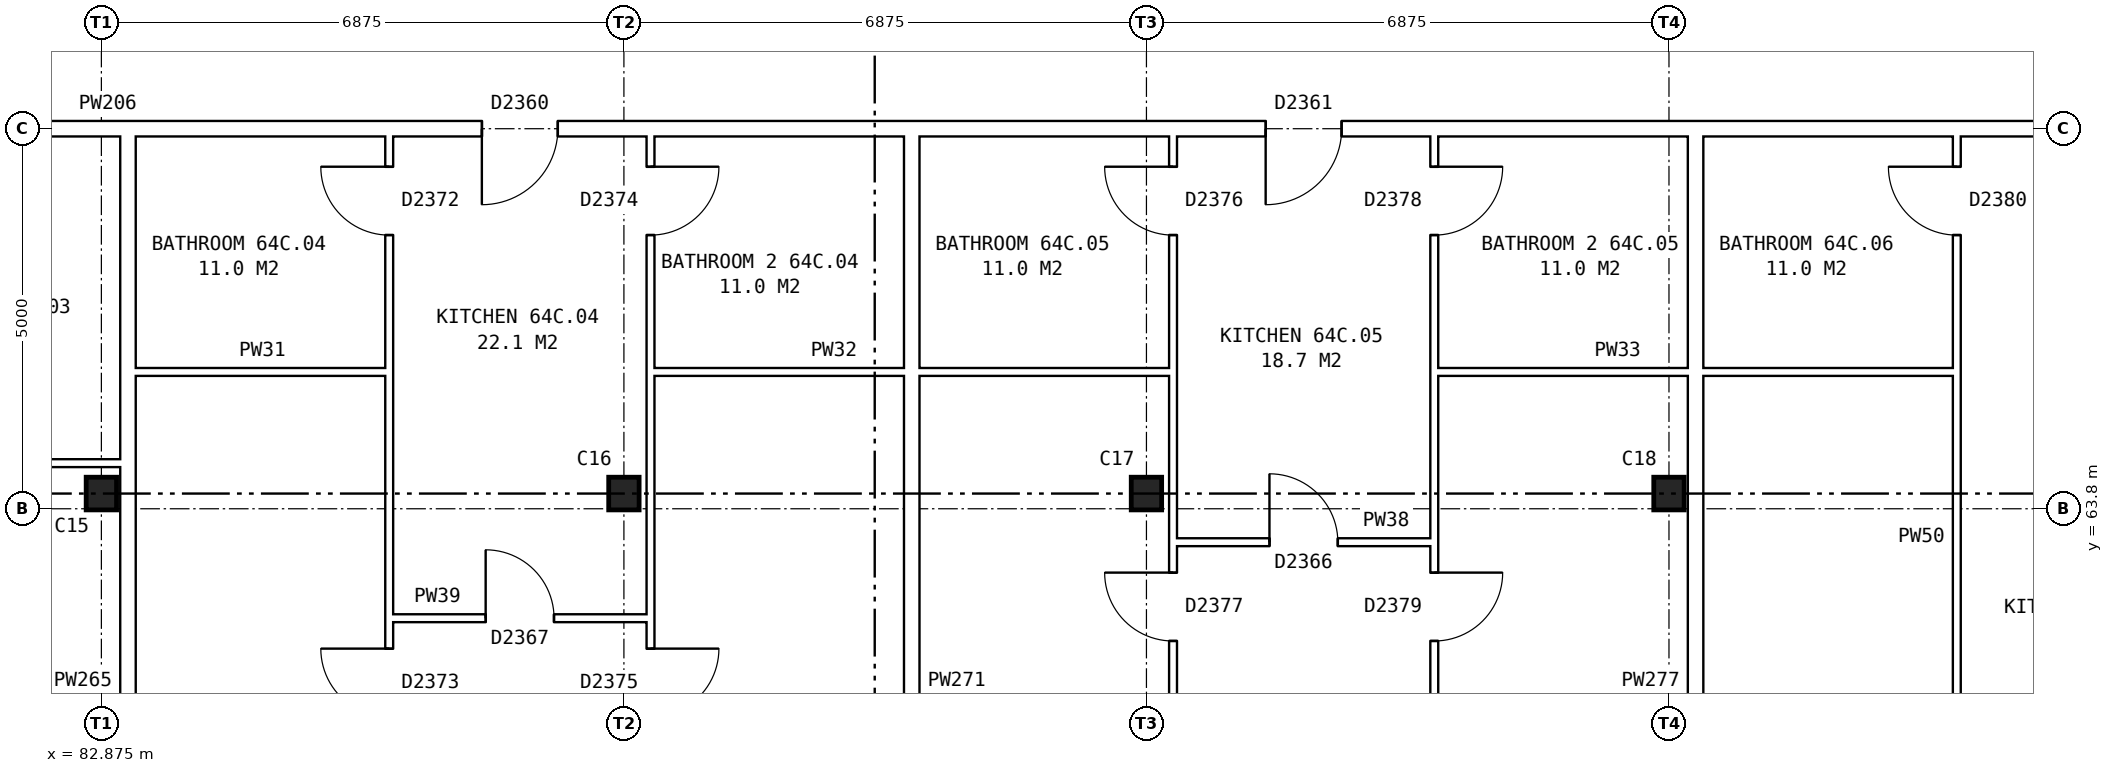
"""IFC4 building model, lengths in metres.
Left out: names, types, materials, properties, quantities, classifications, styles, units other than length and angle.
Written with IfcOpenShell. Run it as: python <this file> out.ifc"""

import sys

from ifc_helpers import new_model, si_unit, direction, frame, frame_2d, origin, origin_2d, place, context, subcontext, project, spatial, rectangle, i_section, extrude, element, fill, save


model = new_model("IFC4")
c1 = context("Model", 3, precision=1e-05, world=origin(), true_north=direction((0.0, 1.0)))
c2 = subcontext(c1, "Body", "Model", "MODEL_VIEW")
j1 = project(units=[si_unit("LENGTHUNIT", "METRE"), si_unit("PLANEANGLEUNIT", "RADIAN")], contexts=[c1])
p1 = place(None, origin())
s1 = spatial("IfcSite", under=j1, at=p1, CompositionType="ELEMENT")
p2 = place(p1, origin())
s2 = spatial("IfcBuilding", under=s1, at=p2, CompositionType="ELEMENT")
p3 = place(p2, frame((0.0, 0.0, 227.6)))
s3 = spatial("IfcBuildingStorey", under=s2, at=p3, CompositionType="ELEMENT", Elevation=227.6)
for number, where, z_axis, x_axis in (
    (1, (82.875, 64.0, 0.0), (0.0, 0.0, 1.0), (1.0, 0.0, 0.0)),
    (2, (89.75, 64.0, 0.0), (0.0, 0.0, 1.0), (1.0, 0.0, 0.0)),
    (3, (96.625, 64.0, 0.0), (0.0, 0.0, 1.0), (1.0, 0.0, 0.0)),
    (4, (103.5, 64.0, 0.0), (0.0, 0.0, 1.0), (1.0, 0.0, 0.0)),
):
    element("IfcColumn", number, at=place(p3, frame(where, z_axis=z_axis, x_axis=x_axis)), inside=s3, PredefinedType="COLUMN", context=c2, shape_type="SweptSolid", body=[
        extrude(i_section(OverallWidth=0.4, OverallDepth=0.43, WebThickness=0.04, FlangeThickness=0.04, at=origin_2d()), origin(), (0.0, 0.0, 1.0), 2.85),
    ])
p4 = place(p3, frame((86.662, 62.36, 0.0), z_axis=(0.0, 0.0, 1.0), x_axis=(1.0, 0.0, 0.0)))
e5 = element("IfcWall", 5, at=p4, inside=s3, PredefinedType="PARTITIONING", context=c2, shape_type="SweptSolid", body=[
    extrude(rectangle(XDim=3.438, YDim=0.1, at=frame_2d((1.719, 0.0))), origin(), (0.0, 0.0, 1.0), 2.85),
])
p5 = place(p4, frame((1.269, 0.0, 0.0)))
e6 = element("IfcOpeningElement", 6, at=p5, cuts=e5, PredefinedType="OPENING", context=c2, shape_type="SweptSolid", body=[
    extrude(rectangle(XDim=0.9, YDim=2.1, at=frame_2d((0.45, 1.05))), frame((0.0, 0.06, 0.0), z_axis=(0.0, -1.0, 0.0), x_axis=(1.0, 0.0, 0.0)), (0.0, 0.0, 1.0), 0.12),
])
p6 = place(p3, frame((96.975, 63.36, 0.0), z_axis=(0.0, 0.0, 1.0), x_axis=(1.0, 0.0, 0.0)))
e7 = element("IfcWall", 7, at=p6, inside=s3, PredefinedType="PARTITIONING", context=c2, shape_type="SweptSolid", body=[
    extrude(rectangle(XDim=3.437, YDim=0.1, at=frame_2d((1.719, 0.0))), origin(), (0.0, 0.0, 1.0), 2.85),
])
p7 = place(p6, frame((1.269, 0.0, 0.0)))
e8 = element("IfcOpeningElement", 8, at=p7, cuts=e7, PredefinedType="OPENING", context=c2, shape_type="SweptSolid", body=[
    extrude(rectangle(XDim=0.9, YDim=2.1, at=frame_2d((0.45, 1.05))), frame((0.0, 0.06, 0.0), z_axis=(0.0, -1.0, 0.0), x_axis=(1.0, 0.0, 0.0)), (0.0, 0.0, 1.0), 0.12),
])
p8 = place(p3, frame((79.438, 64.4, 0.0), z_axis=(0.0, 0.0, 1.0), x_axis=(1.0, 0.0, 0.0)))
e9 = element("IfcWall", 9, at=p8, inside=s3, PredefinedType="PARTITIONING", context=c2, shape_type="SweptSolid", body=[
    extrude(rectangle(XDim=3.687, YDim=0.1, at=frame_2d((1.844, 0.0))), origin(), (0.0, 0.0, 1.0), 2.85),
])
p9 = place(p3, frame((83.325, 65.6, 0.0), z_axis=(0.0, 0.0, 1.0), x_axis=(1.0, 0.0, 0.0)))
e10 = element("IfcWall", 10, at=p9, inside=s3, PredefinedType="PARTITIONING", context=c2, shape_type="SweptSolid", body=[
    extrude(rectangle(XDim=3.337, YDim=0.1, at=frame_2d((1.668, 0.0))), origin(), (0.0, 0.0, 1.0), 2.85),
])
for number, where, z_axis, x_axis in (
    (11, (90.1, 65.6, 0.0), (0.0, 0.0, 1.0), (1.0, 0.0, 0.0)),
    (12, (100.412, 65.6, 0.0), (0.0, 0.0, 1.0), (1.0, 0.0, 0.0)),
):
    element("IfcWall", number, at=place(p3, frame(where, z_axis=z_axis, x_axis=x_axis)), inside=s3, PredefinedType="PARTITIONING", context=c2, shape_type="SweptSolid", body=[
        extrude(rectangle(XDim=6.875, YDim=0.1, at=frame_2d((3.438, 0.0))), origin(), (0.0, 0.0, 1.0), 2.85),
    ])
p10 = place(p3, frame((75.64, 68.8, 0.0), z_axis=(0.0, 0.0, 1.0), x_axis=(1.0, 0.0, 0.0)))
e13 = element("IfcWall", 13, at=p10, inside=s3, PredefinedType="PARTITIONING", context=c2, shape_type="SweptSolid", body=[
    extrude(rectangle(XDim=55.72, YDim=0.2, at=frame_2d((27.86, 0.0))), origin(), (0.0, 0.0, 1.0), 2.85),
])
p11 = place(p10, frame((1.399, 0.0, 0.0)))
e14 = element("IfcOpeningElement", 14, at=p11, cuts=e13, PredefinedType="OPENING", context=c2, shape_type="SweptSolid", body=[
    extrude(rectangle(XDim=1.0, YDim=2.1, at=frame_2d((0.5, 1.05))), frame((0.0, 0.11, 0.0), z_axis=(0.0, -1.0, 0.0), x_axis=(1.0, 0.0, 0.0)), (0.0, 0.0, 1.0), 0.22),
])
p12 = place(p10, frame((12.241, 0.0, 0.0)))
e15 = element("IfcOpeningElement", 15, at=p12, cuts=e13, PredefinedType="OPENING", context=c2, shape_type="SweptSolid", body=[
    extrude(rectangle(XDim=1.0, YDim=2.1, at=frame_2d((0.5, 1.05))), frame((0.0, 0.11, 0.0), z_axis=(0.0, -1.0, 0.0), x_axis=(1.0, 0.0, 0.0)), (0.0, 0.0, 1.0), 0.22),
])
p13 = place(p10, frame((22.553, 0.0, 0.0)))
e16 = element("IfcOpeningElement", 16, at=p13, cuts=e13, PredefinedType="OPENING", context=c2, shape_type="SweptSolid", body=[
    extrude(rectangle(XDim=1.0, YDim=2.1, at=frame_2d((0.5, 1.05))), frame((0.0, 0.11, 0.0), z_axis=(0.0, -1.0, 0.0), x_axis=(1.0, 0.0, 0.0)), (0.0, 0.0, 1.0), 0.22),
])
p14 = place(p10, frame((32.866, 0.0, 0.0)))
e17 = element("IfcOpeningElement", 17, at=p14, cuts=e13, PredefinedType="OPENING", context=c2, shape_type="SweptSolid", body=[
    extrude(rectangle(XDim=1.0, YDim=2.1, at=frame_2d((0.5, 1.05))), frame((0.0, 0.11, 0.0), z_axis=(0.0, -1.0, 0.0), x_axis=(1.0, 0.0, 0.0)), (0.0, 0.0, 1.0), 0.22),
])
p15 = place(p10, frame((36.303, 0.0, 0.0)))
e18 = element("IfcOpeningElement", 18, at=p15, cuts=e13, PredefinedType="OPENING", context=c2, shape_type="SweptSolid", body=[
    extrude(rectangle(XDim=1.0, YDim=2.1, at=frame_2d((0.5, 1.05))), frame((0.0, 0.11, 0.0), z_axis=(0.0, -1.0, 0.0), x_axis=(1.0, 0.0, 0.0)), (0.0, 0.0, 1.0), 0.22),
])
p16 = place(p10, frame((46.616, 0.0, 0.0)))
e19 = element("IfcOpeningElement", 19, at=p16, cuts=e13, PredefinedType="OPENING", context=c2, shape_type="SweptSolid", body=[
    extrude(rectangle(XDim=1.0, YDim=2.1, at=frame_2d((0.5, 1.05))), frame((0.0, 0.11, 0.0), z_axis=(0.0, -1.0, 0.0), x_axis=(1.0, 0.0, 0.0)), (0.0, 0.0, 1.0), 0.22),
])
p17 = place(p10, frame((50.053, 0.0, 0.0)))
e20 = element("IfcOpeningElement", 20, at=p17, cuts=e13, PredefinedType="OPENING", context=c2, shape_type="SweptSolid", body=[
    extrude(rectangle(XDim=1.0, YDim=2.1, at=frame_2d((0.5, 1.05))), frame((0.0, 0.11, 0.0), z_axis=(0.0, -1.0, 0.0), x_axis=(1.0, 0.0, 0.0)), (0.0, 0.0, 1.0), 0.22),
])
p18 = place(p3, frame((83.225, 54.36, 0.0), z_axis=(0.0, 0.0, 1.0), x_axis=(0.0, 1.0, 0.0)))
e21 = element("IfcWall", 21, at=p18, inside=s3, PredefinedType="PARTITIONING", context=c2, shape_type="SweptSolid", body=[
    extrude(rectangle(XDim=14.34, YDim=0.2, at=frame_2d((7.17, 0.0))), origin(), (0.0, 0.0, 1.0), 2.85),
])
p19 = place(p3, frame((86.662, 54.36, 0.0), z_axis=(0.0, 0.0, 1.0), x_axis=(0.0, 1.0, 0.0)))
e22 = element("IfcWall", 22, at=p19, inside=s3, PredefinedType="PARTITIONING", context=c2, shape_type="SweptSolid", body=[
    extrude(rectangle(XDim=14.34, YDim=0.1, at=frame_2d((7.17, 0.0))), origin(), (0.0, 0.0, 1.0), 2.85),
])
p20 = place(p19, frame((6.7, 0.0, 0.0)))
e23 = element("IfcOpeningElement", 23, at=p20, cuts=e22, PredefinedType="OPENING", context=c2, shape_type="SweptSolid", body=[
    extrude(rectangle(XDim=0.9, YDim=2.1, at=frame_2d((0.45, 1.05))), frame((0.0, 0.06, 0.0), z_axis=(0.0, -1.0, 0.0), x_axis=(1.0, 0.0, 0.0)), (0.0, 0.0, 1.0), 0.12),
])
p21 = place(p19, frame((13.04, 0.0, 0.0)))
e24 = element("IfcOpeningElement", 24, at=p21, cuts=e22, PredefinedType="OPENING", context=c2, shape_type="SweptSolid", body=[
    extrude(rectangle(XDim=0.9, YDim=2.1, at=frame_2d((0.45, 1.05))), frame((0.0, 0.06, 0.0), z_axis=(0.0, -1.0, 0.0), x_axis=(1.0, 0.0, 0.0)), (0.0, 0.0, 1.0), 0.12),
])
p22 = place(p3, frame((90.1, 54.36, 0.0), z_axis=(0.0, 0.0, 1.0), x_axis=(0.0, 1.0, 0.0)))
e25 = element("IfcWall", 25, at=p22, inside=s3, PredefinedType="PARTITIONING", context=c2, shape_type="SweptSolid", body=[
    extrude(rectangle(XDim=14.34, YDim=0.1, at=frame_2d((7.17, 0.0))), origin(), (0.0, 0.0, 1.0), 2.85),
])
p23 = place(p22, frame((6.7, 0.0, 0.0)))
e26 = element("IfcOpeningElement", 26, at=p23, cuts=e25, PredefinedType="OPENING", context=c2, shape_type="SweptSolid", body=[
    extrude(rectangle(XDim=0.9, YDim=2.1, at=frame_2d((0.45, 1.05))), frame((0.0, 0.06, 0.0), z_axis=(0.0, -1.0, 0.0), x_axis=(1.0, 0.0, 0.0)), (0.0, 0.0, 1.0), 0.12),
])
p24 = place(p22, frame((13.04, 0.0, 0.0)))
e27 = element("IfcOpeningElement", 27, at=p24, cuts=e25, PredefinedType="OPENING", context=c2, shape_type="SweptSolid", body=[
    extrude(rectangle(XDim=0.9, YDim=2.1, at=frame_2d((0.45, 1.05))), frame((0.0, 0.06, 0.0), z_axis=(0.0, -1.0, 0.0), x_axis=(1.0, 0.0, 0.0)), (0.0, 0.0, 1.0), 0.12),
])
p25 = place(p3, frame((93.537, 54.36, 0.0), z_axis=(0.0, 0.0, 1.0), x_axis=(0.0, 1.0, 0.0)))
e28 = element("IfcWall", 28, at=p25, inside=s3, PredefinedType="PARTITIONING", context=c2, shape_type="SweptSolid", body=[
    extrude(rectangle(XDim=14.34, YDim=0.2, at=frame_2d((7.17, 0.0))), origin(), (0.0, 0.0, 1.0), 2.85),
])
p26 = place(p3, frame((96.975, 54.36, 0.0), z_axis=(0.0, 0.0, 1.0), x_axis=(0.0, 1.0, 0.0)))
e29 = element("IfcWall", 29, at=p26, inside=s3, PredefinedType="PARTITIONING", context=c2, shape_type="SweptSolid", body=[
    extrude(rectangle(XDim=14.34, YDim=0.1, at=frame_2d((7.17, 0.0))), origin(), (0.0, 0.0, 1.0), 2.85),
])
p27 = place(p26, frame((7.7, 0.0, 0.0)))
e30 = element("IfcOpeningElement", 30, at=p27, cuts=e29, PredefinedType="OPENING", context=c2, shape_type="SweptSolid", body=[
    extrude(rectangle(XDim=0.9, YDim=2.1, at=frame_2d((0.45, 1.05))), frame((0.0, 0.06, 0.0), z_axis=(0.0, -1.0, 0.0), x_axis=(1.0, 0.0, 0.0)), (0.0, 0.0, 1.0), 0.12),
])
p28 = place(p26, frame((13.04, 0.0, 0.0)))
e31 = element("IfcOpeningElement", 31, at=p28, cuts=e29, PredefinedType="OPENING", context=c2, shape_type="SweptSolid", body=[
    extrude(rectangle(XDim=0.9, YDim=2.1, at=frame_2d((0.45, 1.05))), frame((0.0, 0.06, 0.0), z_axis=(0.0, -1.0, 0.0), x_axis=(1.0, 0.0, 0.0)), (0.0, 0.0, 1.0), 0.12),
])
p29 = place(p3, frame((100.412, 54.36, 0.0), z_axis=(0.0, 0.0, 1.0), x_axis=(0.0, 1.0, 0.0)))
e32 = element("IfcWall", 32, at=p29, inside=s3, PredefinedType="PARTITIONING", context=c2, shape_type="SweptSolid", body=[
    extrude(rectangle(XDim=14.34, YDim=0.1, at=frame_2d((7.17, 0.0))), origin(), (0.0, 0.0, 1.0), 2.85),
])
p30 = place(p29, frame((7.7, 0.0, 0.0)))
e33 = element("IfcOpeningElement", 33, at=p30, cuts=e32, PredefinedType="OPENING", context=c2, shape_type="SweptSolid", body=[
    extrude(rectangle(XDim=0.9, YDim=2.1, at=frame_2d((0.45, 1.05))), frame((0.0, 0.06, 0.0), z_axis=(0.0, -1.0, 0.0), x_axis=(1.0, 0.0, 0.0)), (0.0, 0.0, 1.0), 0.12),
])
p31 = place(p29, frame((13.04, 0.0, 0.0)))
e34 = element("IfcOpeningElement", 34, at=p31, cuts=e32, PredefinedType="OPENING", context=c2, shape_type="SweptSolid", body=[
    extrude(rectangle(XDim=0.9, YDim=2.1, at=frame_2d((0.45, 1.05))), frame((0.0, 0.06, 0.0), z_axis=(0.0, -1.0, 0.0), x_axis=(1.0, 0.0, 0.0)), (0.0, 0.0, 1.0), 0.12),
])
p32 = place(p3, frame((103.85, 54.36, 0.0), z_axis=(0.0, 0.0, 1.0), x_axis=(0.0, 1.0, 0.0)))
e35 = element("IfcWall", 35, at=p32, inside=s3, PredefinedType="PARTITIONING", context=c2, shape_type="SweptSolid", body=[
    extrude(rectangle(XDim=14.34, YDim=0.2, at=frame_2d((7.17, 0.0))), origin(), (0.0, 0.0, 1.0), 2.85),
])
p33 = place(p3, frame((107.287, 54.36, 0.0), z_axis=(0.0, 0.0, 1.0), x_axis=(0.0, 1.0, 0.0)))
e36 = element("IfcWall", 36, at=p33, inside=s3, PredefinedType="PARTITIONING", context=c2, shape_type="SweptSolid", body=[
    extrude(rectangle(XDim=14.34, YDim=0.1, at=frame_2d((7.17, 0.0))), origin(), (0.0, 0.0, 1.0), 2.85),
])
p34 = place(p33, frame((4.2, 0.0, 0.0)))
e37 = element("IfcOpeningElement", 37, at=p34, cuts=e36, PredefinedType="OPENING", context=c2, shape_type="SweptSolid", body=[
    extrude(rectangle(XDim=0.9, YDim=2.1, at=frame_2d((0.45, 1.05))), frame((0.0, 0.06, 0.0), z_axis=(0.0, -1.0, 0.0), x_axis=(1.0, 0.0, 0.0)), (0.0, 0.0, 1.0), 0.12),
])
p35 = place(p33, frame((13.04, 0.0, 0.0)))
e38 = element("IfcOpeningElement", 38, at=p35, cuts=e36, PredefinedType="OPENING", context=c2, shape_type="SweptSolid", body=[
    extrude(rectangle(XDim=0.9, YDim=2.1, at=frame_2d((0.45, 1.05))), frame((0.0, 0.06, 0.0), z_axis=(0.0, -1.0, 0.0), x_axis=(1.0, 0.0, 0.0)), (0.0, 0.0, 1.0), 0.12),
])
p36 = place(p20, origin())
e39 = element("IfcDoor", 39, at=p36, inside=s3, OperationType="SINGLE_SWING_RIGHT", PredefinedType="DOOR", context=c2, shape_type="SweptSolid", body=[
    extrude(rectangle(XDim=0.9, YDim=2.1, at=frame_2d((0.45, 1.05))), frame((0.0, 0.025, 0.0), z_axis=(0.0, -1.0, 0.0), x_axis=(1.0, 0.0, 0.0)), (0.0, 0.0, 1.0), 0.05),
])
fill(e23, e39)
p37 = place(p23, frame((0.9, 0.0, 0.0), z_axis=(0.0, 0.0, 1.0), x_axis=(-1.0, 0.0, 0.0)))
e40 = element("IfcDoor", 40, at=p37, inside=s3, OperationType="SINGLE_SWING_LEFT", PredefinedType="DOOR", context=c2, shape_type="SweptSolid", body=[
    extrude(rectangle(XDim=0.9, YDim=2.1, at=frame_2d((0.45, 1.05))), frame((0.0, 0.025, 0.0), z_axis=(0.0, -1.0, 0.0), x_axis=(1.0, 0.0, 0.0)), (0.0, 0.0, 1.0), 0.05),
])
fill(e26, e40)
p38 = place(p12, frame((1.0, 0.0, 0.0), z_axis=(0.0, 0.0, 1.0), x_axis=(-1.0, 0.0, 0.0)))
e41 = element("IfcDoor", 41, at=p38, inside=s3, OperationType="SINGLE_SWING_RIGHT", PredefinedType="DOOR", context=c2, shape_type="SweptSolid", body=[
    extrude(rectangle(XDim=1.0, YDim=2.1, at=frame_2d((0.5, 1.05))), frame((0.0, 0.025, 0.0), z_axis=(0.0, -1.0, 0.0), x_axis=(1.0, 0.0, 0.0)), (0.0, 0.0, 1.0), 0.05),
])
fill(e15, e41)
p39 = place(p5, origin())
e42 = element("IfcDoor", 42, at=p39, inside=s3, OperationType="SINGLE_SWING_LEFT", PredefinedType="DOOR", context=c2, shape_type="SweptSolid", body=[
    extrude(rectangle(XDim=0.9, YDim=2.1, at=frame_2d((0.45, 1.05))), frame((0.0, 0.025, 0.0), z_axis=(0.0, -1.0, 0.0), x_axis=(1.0, 0.0, 0.0)), (0.0, 0.0, 1.0), 0.05),
])
fill(e6, e42)
p40 = place(p21, origin())
e43 = element("IfcDoor", 43, at=p40, inside=s3, OperationType="SINGLE_SWING_RIGHT", PredefinedType="DOOR", context=c2, shape_type="SweptSolid", body=[
    extrude(rectangle(XDim=0.9, YDim=2.1, at=frame_2d((0.45, 1.05))), frame((0.0, 0.025, 0.0), z_axis=(0.0, -1.0, 0.0), x_axis=(1.0, 0.0, 0.0)), (0.0, 0.0, 1.0), 0.05),
])
fill(e24, e43)
p41 = place(p24, frame((0.9, 0.0, 0.0), z_axis=(0.0, 0.0, 1.0), x_axis=(-1.0, 0.0, 0.0)))
e44 = element("IfcDoor", 44, at=p41, inside=s3, OperationType="SINGLE_SWING_LEFT", PredefinedType="DOOR", context=c2, shape_type="SweptSolid", body=[
    extrude(rectangle(XDim=0.9, YDim=2.1, at=frame_2d((0.45, 1.05))), frame((0.0, 0.025, 0.0), z_axis=(0.0, -1.0, 0.0), x_axis=(1.0, 0.0, 0.0)), (0.0, 0.0, 1.0), 0.05),
])
fill(e27, e44)
p42 = place(p27, origin())
e45 = element("IfcDoor", 45, at=p42, inside=s3, OperationType="SINGLE_SWING_RIGHT", PredefinedType="DOOR", context=c2, shape_type="SweptSolid", body=[
    extrude(rectangle(XDim=0.9, YDim=2.1, at=frame_2d((0.45, 1.05))), frame((0.0, 0.025, 0.0), z_axis=(0.0, -1.0, 0.0), x_axis=(1.0, 0.0, 0.0)), (0.0, 0.0, 1.0), 0.05),
])
fill(e30, e45)
p43 = place(p30, frame((0.9, 0.0, 0.0), z_axis=(0.0, 0.0, 1.0), x_axis=(-1.0, 0.0, 0.0)))
e46 = element("IfcDoor", 46, at=p43, inside=s3, OperationType="SINGLE_SWING_LEFT", PredefinedType="DOOR", context=c2, shape_type="SweptSolid", body=[
    extrude(rectangle(XDim=0.9, YDim=2.1, at=frame_2d((0.45, 1.05))), frame((0.0, 0.025, 0.0), z_axis=(0.0, -1.0, 0.0), x_axis=(1.0, 0.0, 0.0)), (0.0, 0.0, 1.0), 0.05),
])
fill(e33, e46)
p44 = place(p13, frame((1.0, 0.0, 0.0), z_axis=(0.0, 0.0, 1.0), x_axis=(-1.0, 0.0, 0.0)))
e47 = element("IfcDoor", 47, at=p44, inside=s3, OperationType="SINGLE_SWING_RIGHT", PredefinedType="DOOR", context=c2, shape_type="SweptSolid", body=[
    extrude(rectangle(XDim=1.0, YDim=2.1, at=frame_2d((0.5, 1.05))), frame((0.0, 0.025, 0.0), z_axis=(0.0, -1.0, 0.0), x_axis=(1.0, 0.0, 0.0)), (0.0, 0.0, 1.0), 0.05),
])
fill(e16, e47)
p45 = place(p7, origin())
e48 = element("IfcDoor", 48, at=p45, inside=s3, OperationType="SINGLE_SWING_LEFT", PredefinedType="DOOR", context=c2, shape_type="SweptSolid", body=[
    extrude(rectangle(XDim=0.9, YDim=2.1, at=frame_2d((0.45, 1.05))), frame((0.0, 0.025, 0.0), z_axis=(0.0, -1.0, 0.0), x_axis=(1.0, 0.0, 0.0)), (0.0, 0.0, 1.0), 0.05),
])
fill(e8, e48)
p46 = place(p28, origin())
e49 = element("IfcDoor", 49, at=p46, inside=s3, OperationType="SINGLE_SWING_RIGHT", PredefinedType="DOOR", context=c2, shape_type="SweptSolid", body=[
    extrude(rectangle(XDim=0.9, YDim=2.1, at=frame_2d((0.45, 1.05))), frame((0.0, 0.025, 0.0), z_axis=(0.0, -1.0, 0.0), x_axis=(1.0, 0.0, 0.0)), (0.0, 0.0, 1.0), 0.05),
])
fill(e31, e49)
p47 = place(p31, frame((0.9, 0.0, 0.0), z_axis=(0.0, 0.0, 1.0), x_axis=(-1.0, 0.0, 0.0)))
e50 = element("IfcDoor", 50, at=p47, inside=s3, OperationType="SINGLE_SWING_LEFT", PredefinedType="DOOR", context=c2, shape_type="SweptSolid", body=[
    extrude(rectangle(XDim=0.9, YDim=2.1, at=frame_2d((0.45, 1.05))), frame((0.0, 0.025, 0.0), z_axis=(0.0, -1.0, 0.0), x_axis=(1.0, 0.0, 0.0)), (0.0, 0.0, 1.0), 0.05),
])
fill(e34, e50)
p48 = place(p35, origin())
e51 = element("IfcDoor", 51, at=p48, inside=s3, OperationType="SINGLE_SWING_RIGHT", PredefinedType="DOOR", context=c2, shape_type="SweptSolid", body=[
    extrude(rectangle(XDim=0.9, YDim=2.1, at=frame_2d((0.45, 1.05))), frame((0.0, 0.025, 0.0), z_axis=(0.0, -1.0, 0.0), x_axis=(1.0, 0.0, 0.0)), (0.0, 0.0, 1.0), 0.05),
])
fill(e38, e51)
save(model, sys.argv[1])
